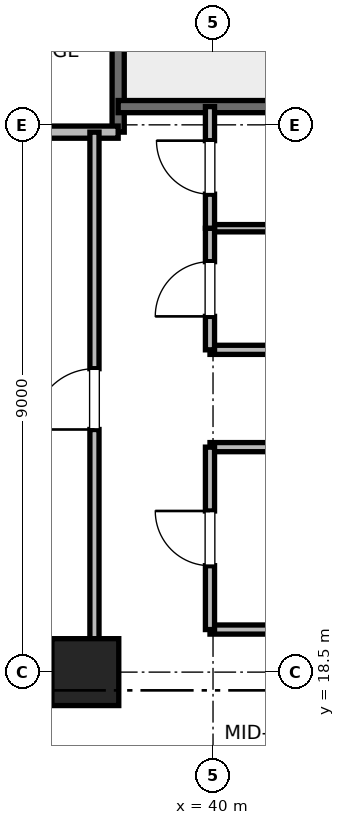
"""IFC4 building model, lengths in metres.
Left out: names, types, materials, properties, quantities, classifications, styles, units other than length and angle.
Written with IfcOpenShell. Run it as: python <this file> out.ifc"""

import sys

from ifc_helpers import new_model, si_unit, direction, frame, frame_2d, origin, origin_2d, place, context, subcontext, project, spatial, rectangle, extrude, element, fill, save


model = new_model("IFC4")
c1 = context("Model", 3, precision=1e-05, world=origin(), true_north=direction((0.0, 1.0)))
c2 = subcontext(c1, "Body", "Model", "MODEL_VIEW")
j1 = project(units=[si_unit("LENGTHUNIT", "METRE"), si_unit("PLANEANGLEUNIT", "RADIAN")], contexts=[c1])
p1 = place(None, origin())
s1 = spatial("IfcSite", under=j1, at=p1, CompositionType="ELEMENT")
p2 = place(p1, origin())
s2 = spatial("IfcBuilding", under=s1, at=p2, CompositionType="ELEMENT")
p3 = place(p2, frame((0.0, 0.0, 176.4)))
s3 = spatial("IfcBuildingStorey", under=s2, at=p3, CompositionType="ELEMENT", Elevation=176.4)
p4 = place(p3, frame((37.9, 18.5, 0.0), z_axis=(0.0, 0.0, 1.0), x_axis=(1.0, 0.0, 0.0)))
e1 = element("IfcColumn", 1, at=p4, inside=s3, PredefinedType="PILASTER", context=c2, shape_type="SweptSolid", body=[
    extrude(rectangle(XDim=1.1, YDim=1.1, at=origin_2d()), origin(), (0.0, 0.0, 1.0), 4.0),
])
p5 = place(p3, frame((29.0, 18.5, 0.0), z_axis=(0.0, 0.0, 1.0), x_axis=(1.0, 0.0, 0.0)))
e2 = element("IfcWall", 2, at=p5, inside=s3, PredefinedType="SHEAR", context=c2, shape_type="SweptSolid", body=[
    extrude(rectangle(XDim=9.2, YDim=0.55, at=frame_2d((4.6, 0.0))), origin(), (0.0, 0.0, 1.0), 3.775),
])
p6 = place(p3, frame((38.44, 27.38, 0.0), z_axis=(0.0, 0.0, 1.0), x_axis=(0.0, 1.0, 0.0)))
e3 = element("IfcWall", 3, at=p6, inside=s3, PredefinedType="SOLIDWALL", context=c2, shape_type="SweptSolid", body=[
    extrude(rectangle(XDim=8.87, YDim=0.2, at=frame_2d((4.435, 0.0))), origin(), (0.0, 0.0, 1.0), 3.775),
])
p7 = place(p3, frame((38.44, 27.8, 0.0), z_axis=(0.0, 0.0, 1.0), x_axis=(1.0, 0.0, 0.0)))
e4 = element("IfcWall", 4, at=p7, inside=s3, PredefinedType="SOLIDWALL", context=c2, shape_type="SweptSolid", body=[
    extrude(rectangle(XDim=3.32, YDim=0.2, at=frame_2d((1.66, 0.0))), origin(), (0.0, 0.0, 1.0), 3.775),
])
p8 = place(p3, frame((32.82, 27.38, 0.0), z_axis=(0.0, 0.0, 1.0), x_axis=(1.0, 0.0, 0.0)))
e5 = element("IfcWall", 5, at=p8, inside=s3, PredefinedType="PARTITIONING", context=c2, shape_type="SweptSolid", body=[
    extrude(rectangle(XDim=5.62, YDim=0.2, at=frame_2d((2.81, 0.0))), origin(), (0.0, 0.0, 1.0), 3.775),
])
for number, where, z_axis, x_axis in (
    (6, (39.95, 19.2, 0.0), (0.0, 0.0, 1.0), (1.0, 0.0, 0.0)),
    (7, (39.95, 22.2, 0.0), (0.0, 0.0, 1.0), (1.0, 0.0, 0.0)),
    (8, (39.95, 23.8, 0.0), (0.0, 0.0, 1.0), (1.0, 0.0, 0.0)),
):
    element("IfcWall", number, at=place(p3, frame(where, z_axis=z_axis, x_axis=x_axis)), inside=s3, PredefinedType="PARTITIONING", context=c2, shape_type="SweptSolid", body=[
        extrude(rectangle(XDim=1.81, YDim=0.15, at=frame_2d((0.905, 0.0))), origin(), (0.0, 0.0, 1.0), 2.85),
    ])
p9 = place(p3, frame((39.95, 25.8, 0.0), z_axis=(0.0, 0.0, 1.0), x_axis=(1.0, 0.0, 0.0)))
e9 = element("IfcWall", 9, at=p9, inside=s3, PredefinedType="PARTITIONING", context=c2, shape_type="SweptSolid", body=[
    extrude(rectangle(XDim=1.81, YDim=0.12, at=frame_2d((0.905, 0.0))), origin(), (0.0, 0.0, 1.0), 2.85),
])
p10 = place(p3, frame((39.95, 19.2, 0.0), z_axis=(0.0, 0.0, 1.0), x_axis=(0.0, 1.0, 0.0)))
e10 = element("IfcWall", 10, at=p10, inside=s3, PredefinedType="PARTITIONING", context=c2, shape_type="SweptSolid", body=[
    extrude(rectangle(XDim=3.0, YDim=0.15, at=frame_2d((1.5, 0.0))), origin(), (0.0, 0.0, 1.0), 2.85),
])
p11 = place(p10, frame((1.05, 0.0, 0.0)))
e11 = element("IfcOpeningElement", 11, at=p11, cuts=e10, PredefinedType="OPENING", context=c2, shape_type="SweptSolid", body=[
    extrude(rectangle(XDim=0.9, YDim=2.1, at=frame_2d((0.45, 1.05))), frame((0.0, 0.075, 0.0), z_axis=(0.0, -1.0, 0.0), x_axis=(1.0, 0.0, 0.0)), (0.0, 0.0, 1.0), 0.15),
])
p12 = place(p3, frame((39.95, 23.8, 0.0), z_axis=(0.0, 0.0, 1.0), x_axis=(0.0, 1.0, 0.0)))
e12 = element("IfcWall", 12, at=p12, inside=s3, PredefinedType="PARTITIONING", context=c2, shape_type="SweptSolid", body=[
    extrude(rectangle(XDim=2.0, YDim=0.15, at=frame_2d((1.0, 0.0))), origin(), (0.0, 0.0, 1.0), 2.85),
])
p13 = place(p12, frame((0.55, 0.0, 0.0)))
e13 = element("IfcOpeningElement", 13, at=p13, cuts=e12, PredefinedType="OPENING", context=c2, shape_type="SweptSolid", body=[
    extrude(rectangle(XDim=0.9, YDim=2.1, at=frame_2d((0.45, 1.05))), frame((0.0, 0.075, 0.0), z_axis=(0.0, -1.0, 0.0), x_axis=(1.0, 0.0, 0.0)), (0.0, 0.0, 1.0), 0.15),
])
p14 = place(p3, frame((39.95, 25.8, 0.0), z_axis=(0.0, 0.0, 1.0), x_axis=(0.0, 1.0, 0.0)))
e14 = element("IfcWall", 14, at=p14, inside=s3, PredefinedType="PARTITIONING", context=c2, shape_type="SweptSolid", body=[
    extrude(rectangle(XDim=2.0, YDim=0.15, at=frame_2d((1.0, 0.0))), origin(), (0.0, 0.0, 1.0), 2.85),
])
p15 = place(p14, frame((0.56, 0.0, 0.0)))
e15 = element("IfcOpeningElement", 15, at=p15, cuts=e14, PredefinedType="OPENING", context=c2, shape_type="SweptSolid", body=[
    extrude(rectangle(XDim=0.88, YDim=2.1, at=frame_2d((0.44, 1.05))), frame((0.0, 0.075, 0.0), z_axis=(0.0, -1.0, 0.0), x_axis=(1.0, 0.0, 0.0)), (0.0, 0.0, 1.0), 0.15),
])
p16 = place(p3, frame((38.05, 18.6, 0.0), z_axis=(0.0, 0.0, 1.0), x_axis=(0.0, 1.0, 0.0)))
e16 = element("IfcWall", 16, at=p16, inside=s3, PredefinedType="PARTITIONING", context=c2, shape_type="SweptSolid", body=[
    extrude(rectangle(XDim=8.78, YDim=0.15, at=frame_2d((4.39, 0.0))), origin(), (0.0, 0.0, 1.0), 2.755),
])
p17 = place(p16, frame((3.89, 0.0, 0.0)))
e17 = element("IfcOpeningElement", 17, at=p17, cuts=e16, PredefinedType="OPENING", context=c2, shape_type="SweptSolid", body=[
    extrude(rectangle(XDim=1.0, YDim=2.15, at=frame_2d((0.5, 1.075))), frame((0.0, 0.075, 0.0), z_axis=(0.0, -1.0, 0.0), x_axis=(1.0, 0.0, 0.0)), (0.0, 0.0, 1.0), 0.15),
])
p18 = place(p11, origin())
e18 = element("IfcDoor", 18, at=p18, inside=s3, OperationType="SINGLE_SWING_RIGHT", PredefinedType="DOOR", context=c2, shape_type="SweptSolid", body=[
    extrude(rectangle(XDim=0.9, YDim=2.1, at=frame_2d((0.45, 1.05))), frame((0.0, 0.025, 0.0), z_axis=(0.0, -1.0, 0.0), x_axis=(1.0, 0.0, 0.0)), (0.0, 0.0, 1.0), 0.05),
])
fill(e11, e18)
p19 = place(p13, origin())
e19 = element("IfcDoor", 19, at=p19, inside=s3, OperationType="SINGLE_SWING_LEFT", PredefinedType="DOOR", context=c2, shape_type="SweptSolid", body=[
    extrude(rectangle(XDim=0.9, YDim=2.1, at=frame_2d((0.45, 1.05))), frame((0.0, 0.025, 0.0), z_axis=(0.0, -1.0, 0.0), x_axis=(1.0, 0.0, 0.0)), (0.0, 0.0, 1.0), 0.05),
])
fill(e13, e19)
p20 = place(p15, origin())
e20 = element("IfcDoor", 20, at=p20, inside=s3, OperationType="SINGLE_SWING_RIGHT", PredefinedType="DOOR", context=c2, shape_type="SweptSolid", body=[
    extrude(rectangle(XDim=0.88, YDim=2.1, at=frame_2d((0.44, 1.05))), frame((0.0, 0.025, 0.0), z_axis=(0.0, -1.0, 0.0), x_axis=(1.0, 0.0, 0.0)), (0.0, 0.0, 1.0), 0.05),
])
fill(e15, e20)
p21 = place(p17, origin())
e21 = element("IfcDoor", 21, at=p21, inside=s3, OperationType="SINGLE_SWING_LEFT", PredefinedType="DOOR", context=c2, shape_type="SweptSolid", body=[
    extrude(rectangle(XDim=1.0, YDim=2.15, at=frame_2d((0.5, 1.075))), frame((0.0, 0.025, 0.0), z_axis=(0.0, -1.0, 0.0), x_axis=(1.0, 0.0, 0.0)), (0.0, 0.0, 1.0), 0.05),
])
fill(e17, e21)
save(model, sys.argv[1])
